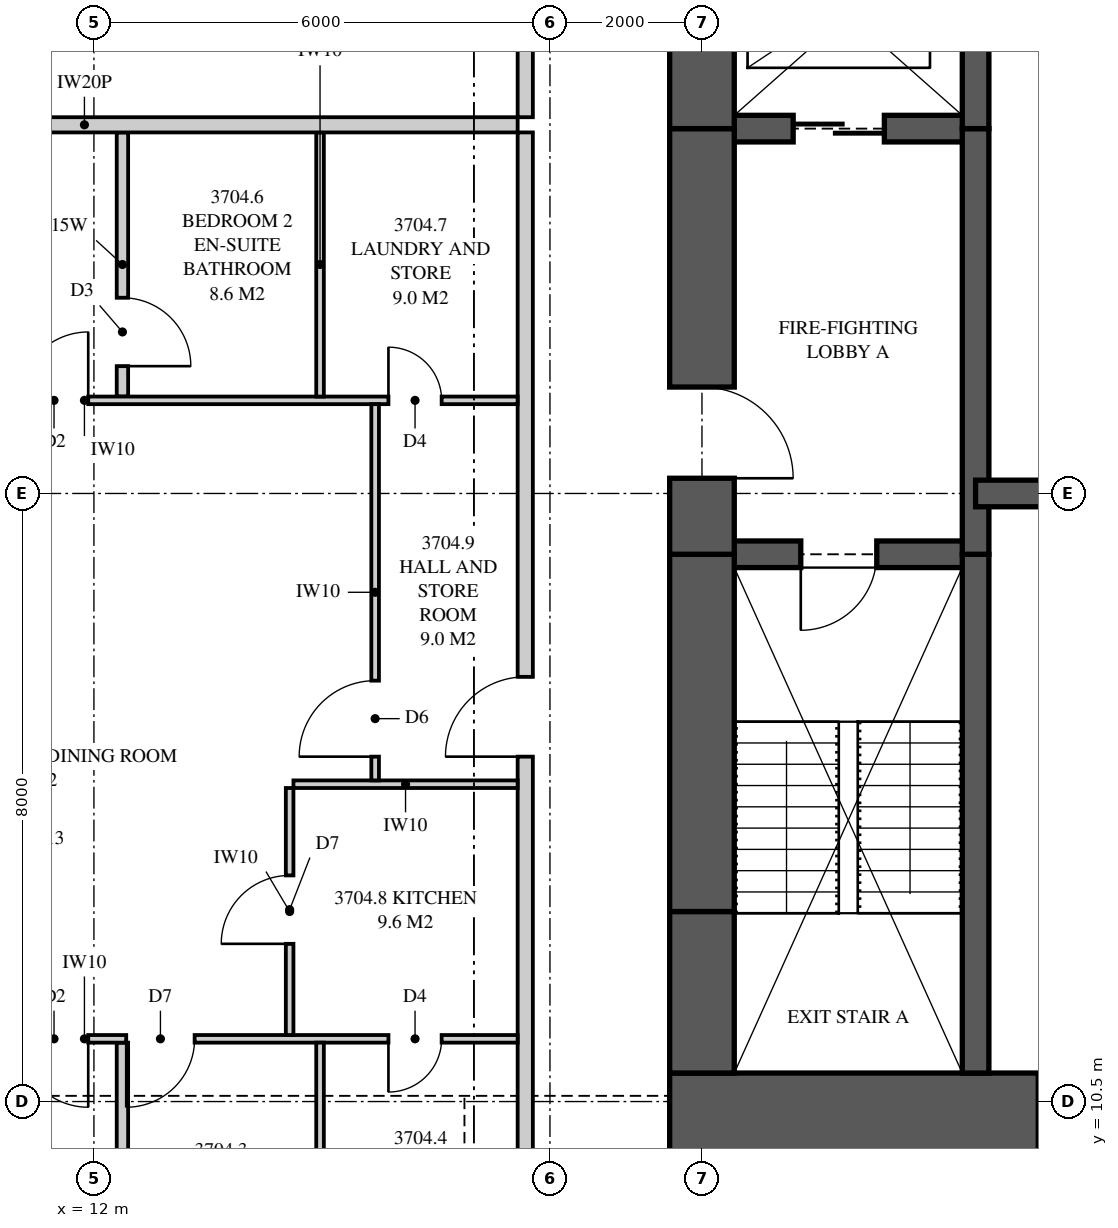
"""IFC4 building model, lengths in metres.
Left out: names, types, materials, properties, quantities, classifications, styles, units other than length and angle.
Written with IfcOpenShell. Run it as: python <this file> out.ifc"""

import sys

from ifc_helpers import new_model, si_unit, direction, frame, frame_2d, origin, place, context, subcontext, project, spatial, polyline, rectangle, outline, extrude, element, fill, save


model = new_model("IFC4")
c1 = context("Model", 3, precision=1e-05, world=origin(), true_north=direction((0.0, 1.0)))
c2 = subcontext(c1, "Body", "Model", "MODEL_VIEW")
j1 = project(units=[si_unit("LENGTHUNIT", "METRE"), si_unit("PLANEANGLEUNIT", "RADIAN")], contexts=[c1])
p1 = place(None, origin())
s1 = spatial("IfcSite", under=j1, at=p1, CompositionType="ELEMENT")
p2 = place(p1, origin())
s2 = spatial("IfcBuilding", under=s1, at=p2, CompositionType="ELEMENT")
p3 = place(p2, frame((0.0, 0.0, 135.0)))
s3 = spatial("IfcBuildingStorey", under=s2, at=p3, CompositionType="ELEMENT", Elevation=135.0)
p4 = place(p3, frame((19.575, 10.125, 0.0), z_axis=(0.0, 0.0, 1.0), x_axis=(1.0, 0.0, 0.0)))
e1 = element("IfcWall", 1, at=p4, inside=s3, PredefinedType="SHEAR", context=c2, shape_type="SweptSolid", body=[
    extrude(rectangle(XDim=6.425, YDim=1.5, at=frame_2d((3.212, 0.0))), origin(), (0.0, 0.0, 1.0), 3.35),
])
p5 = place(p4, frame((4.85, 0.0, 0.0)))
e2 = element("IfcOpeningElement", 2, at=p5, cuts=e1, PredefinedType="OPENING", context=c2, shape_type="SweptSolid", body=[
    extrude(rectangle(XDim=0.75, YDim=2.1, at=frame_2d((0.375, 1.05))), frame((0.0, 0.76, 0.0), z_axis=(0.0, -1.0, 0.0), x_axis=(1.0, 0.0, 0.0)), (0.0, 0.0, 1.0), 1.52),
])
p6 = place(p3, frame((20.0, 26.125, 0.0), z_axis=(0.0, 0.0, 1.0), x_axis=(0.0, -1.0, 0.0)))
e3 = element("IfcWall", 3, at=p6, inside=s3, PredefinedType="SHEAR", context=c2, shape_type="SweptSolid", body=[
    extrude(rectangle(XDim=2.825, YDim=0.85, at=frame_2d((1.413, 0.0))), origin(), (0.0, 0.0, 1.0), 3.35),
])
p7 = place(p3, frame((20.0, 23.3, 0.0), z_axis=(0.0, 0.0, 1.0), x_axis=(0.0, -1.0, 0.0)))
e4 = element("IfcWall", 4, at=p7, inside=s3, PredefinedType="SHEAR", context=c2, shape_type="SweptSolid", body=[
    extrude(rectangle(XDim=5.6, YDim=0.85, at=frame_2d((2.8, 0.0))), origin(), (0.0, 0.0, 1.0), 3.35),
])
p8 = place(p7, frame((3.4, 0.0, 0.0)))
e5 = element("IfcOpeningElement", 5, at=p8, cuts=e4, PredefinedType="OPENING", context=c2, shape_type="SweptSolid", body=[
    extrude(rectangle(XDim=1.2, YDim=2.2, at=frame_2d((0.6, 1.1))), frame((0.0, 0.435, 0.0), z_axis=(0.0, -1.0, 0.0), x_axis=(1.0, 0.0, 0.0)), (0.0, 0.0, 1.0), 0.87),
])
p9 = place(p3, frame((20.0, 17.7, 0.0), z_axis=(0.0, 0.0, 1.0), x_axis=(0.0, -1.0, 0.0)))
e6 = element("IfcWall", 6, at=p9, inside=s3, PredefinedType="SHEAR", context=c2, shape_type="SweptSolid", body=[
    extrude(rectangle(XDim=4.7, YDim=0.85, at=frame_2d((2.35, 0.0))), origin(), (0.0, 0.0, 1.0), 3.35),
])
p10 = place(p3, frame((20.0, 13.0, 0.0), z_axis=(0.0, 0.0, 1.0), x_axis=(0.0, -1.0, 0.0)))
e7 = element("IfcWall", 7, at=p10, inside=s3, PredefinedType="SHEAR", context=c2, shape_type="SweptSolid", body=[
    extrude(rectangle(XDim=2.125, YDim=0.85, at=frame_2d((1.062, 0.0))), origin(), (0.0, 0.0, 1.0), 3.35),
])
p11 = place(p3, frame((23.6, 10.875, 0.0), z_axis=(0.0, 0.0, 1.0), x_axis=(0.0, 1.0, 0.0)))
e8 = element("IfcWall", 8, at=p11, inside=s3, PredefinedType="SHEAR", context=c2, shape_type="SweptSolid", body=[
    extrude(rectangle(XDim=6.825, YDim=0.35, at=frame_2d((3.413, 0.0))), origin(), (0.0, 0.0, 1.0), 3.35),
])
p12 = place(p3, frame((23.6, 17.7, 0.0), z_axis=(0.0, 0.0, 1.0), x_axis=(0.0, 1.0, 0.0)))
e9 = element("IfcWall", 9, at=p12, inside=s3, PredefinedType="SHEAR", context=c2, shape_type="SweptSolid", body=[
    extrude(rectangle(XDim=5.6, YDim=0.35, at=frame_2d((2.8, 0.0))), origin(), (0.0, 0.0, 1.0), 3.35),
])
p13 = place(p3, frame((23.6, 23.3, 0.0), z_axis=(0.0, 0.0, 1.0), x_axis=(0.0, 1.0, 0.0)))
e10 = element("IfcWall", 10, at=p13, inside=s3, PredefinedType="SHEAR", context=c2, shape_type="SweptSolid", body=[
    extrude(rectangle(XDim=2.825, YDim=0.35, at=frame_2d((1.413, 0.0))), origin(), (0.0, 0.0, 1.0), 3.35),
])
p14 = place(p3, frame((20.0, 17.7, 0.0), z_axis=(0.0, 0.0, 1.0), x_axis=(1.0, 0.0, 0.0)))
e11 = element("IfcWall", 11, at=p14, inside=s3, PredefinedType="SHEAR", context=c2, shape_type="SweptSolid", body=[
    extrude(rectangle(XDim=3.6, YDim=0.35, at=frame_2d((1.8, 0.0))), origin(), (0.0, 0.0, 1.0), 3.35),
])
p15 = place(p14, frame((1.3, 0.0, 0.0)))
e12 = element("IfcOpeningElement", 12, at=p15, cuts=e11, PredefinedType="OPENING", context=c2, shape_type="SweptSolid", body=[
    extrude(rectangle(XDim=1.0, YDim=2.1, at=frame_2d((0.5, 1.05))), frame((0.0, 0.185, 0.0), z_axis=(0.0, -1.0, 0.0), x_axis=(1.0, 0.0, 0.0)), (0.0, 0.0, 1.0), 0.37),
])
p16 = place(p3, frame((20.0, 23.3, 0.0), z_axis=(0.0, 0.0, 1.0), x_axis=(1.0, 0.0, 0.0)))
e13 = element("IfcWall", 13, at=p16, inside=s3, PredefinedType="SHEAR", context=c2, shape_type="SweptSolid", body=[
    extrude(rectangle(XDim=3.6, YDim=0.35, at=frame_2d((1.8, 0.0))), origin(), (0.0, 0.0, 1.0), 3.35),
])
p17 = place(p16, frame((1.2, 0.0, 0.0)))
e14 = element("IfcOpeningElement", 14, at=p17, cuts=e13, PredefinedType="OPENING", context=c2, shape_type="SweptSolid", body=[
    extrude(rectangle(XDim=1.2, YDim=2.1, at=frame_2d((0.6, 1.05))), frame((0.0, 0.185, 0.0), z_axis=(0.0, -1.0, 0.0), x_axis=(1.0, 0.0, 0.0)), (0.0, 0.0, 1.0), 0.37),
])
p18 = place(p3, frame((23.6, 18.5, 0.0), z_axis=(0.0, 0.0, 1.0), x_axis=(1.0, 0.0, 0.0)))
e15 = element("IfcWall", 15, at=p18, inside=s3, PredefinedType="SHEAR", context=c2, shape_type="SweptSolid", body=[
    extrude(rectangle(XDim=2.4, YDim=0.35, at=frame_2d((1.2, 0.0))), origin(), (0.0, 0.0, 1.0), 3.35),
])
p19 = place(p3, frame((6.175, 23.35, 0.0), z_axis=(0.0, 0.0, 1.0), x_axis=(1.0, 0.0, 0.0)))
e16 = element("IfcWall", 16, at=p19, inside=s3, PredefinedType="PARTITIONING", context=c2, shape_type="SweptSolid", body=[
    extrude(outline(polyline([(0.529, 2.15), (0.0, 2.15), (0.0, 0.0), (0.529, 0.0), (0.529, 0.376), (1.021, 0.376), (1.021, 0.0), (11.4, 0.0), (11.4, 3.11), (5.335, 3.11), (5.335, 2.51), (2.715, 2.51), (2.715, 3.11), (1.685, 3.11), (1.685, 2.15), (1.021, 2.15), (1.021, 1.774), (0.529, 1.774), (0.529, 2.15)])), frame((0.0, 0.1, 0.0), z_axis=(0.0, -1.0, 0.0), x_axis=(1.0, 0.0, 0.0)), (0.0, 0.0, 1.0), 0.2),
])
p20 = place(p3, frame((17.675, 7.825, 0.0), z_axis=(0.0, 0.0, 1.0), x_axis=(0.0, 1.0, 0.0)))
e17 = element("IfcWall", 17, at=p20, inside=s3, PredefinedType="PARTITIONING", context=c2, shape_type="SweptSolid", body=[
    extrude(outline(polyline([(0.0, 0.0), (15.425, 0.0), (15.425, 3.11), (3.087, 3.11), (3.087, 2.541), (2.413, 2.541), (2.413, 3.11), (0.0, 3.11), (0.0, 0.0)])), frame((0.0, 0.1, 0.0), z_axis=(0.0, -1.0, 0.0), x_axis=(1.0, 0.0, 0.0)), (0.0, 0.0, 1.0), 0.2),
])
p21 = place(p20, frame((7.212, 0.0, 0.0)))
e18 = element("IfcOpeningElement", 18, at=p21, cuts=e17, PredefinedType="OPENING", context=c2, shape_type="SweptSolid", body=[
    extrude(rectangle(XDim=1.05, YDim=2.2, at=frame_2d((0.525, 1.1))), frame((0.0, 0.11, 0.0), z_axis=(0.0, -1.0, 0.0), x_axis=(1.0, 0.0, 0.0)), (0.0, 0.0, 1.0), 0.22),
])
p22 = place(p3, frame((6.175, 11.325, 0.0), z_axis=(0.0, 0.0, 1.0), x_axis=(1.0, 0.0, 0.0)))
e19 = element("IfcWall", 19, at=p22, inside=s3, PredefinedType="PARTITIONING", context=c2, shape_type="SweptSolid", body=[
    extrude(outline(polyline([(0.175, 3.11), (0.0, 3.11), (0.0, 0.0), (0.529, 0.0), (0.529, 0.325), (1.021, 0.325), (1.021, 0.0), (11.4, 0.0), (11.4, 3.11), (5.285, 3.11), (5.285, 2.51), (2.765, 2.51), (2.765, 3.11), (2.744, 3.11), (2.744, 2.541), (2.169, 2.541), (2.169, 3.11), (1.918, 3.11), (1.918, 2.15), (1.021, 2.15), (1.021, 1.825), (0.529, 1.825), (0.529, 2.15), (0.175, 2.15), (0.175, 3.11)])), frame((0.0, 0.05, 0.0), z_axis=(0.0, -1.0, 0.0), x_axis=(1.0, 0.0, 0.0)), (0.0, 0.0, 1.0), 0.1),
])
p23 = place(p22, frame((4.85, 0.0, 0.0)))
e20 = element("IfcOpeningElement", 20, at=p23, cuts=e19, PredefinedType="OPENING", context=c2, shape_type="SweptSolid", body=[
    extrude(rectangle(XDim=0.9, YDim=2.1, at=frame_2d((0.45, 1.05))), frame((0.0, 0.06, 0.0), z_axis=(0.0, -1.0, 0.0), x_axis=(1.0, 0.0, 0.0)), (0.0, 0.0, 1.0), 0.12),
])
p24 = place(p22, frame((6.25, 0.0, 0.0)))
e21 = element("IfcOpeningElement", 21, at=p24, cuts=e19, PredefinedType="OPENING", context=c2, shape_type="SweptSolid", body=[
    extrude(rectangle(XDim=0.9, YDim=2.1, at=frame_2d((0.45, 1.05))), frame((0.0, 0.06, 0.0), z_axis=(0.0, -1.0, 0.0), x_axis=(1.0, 0.0, 0.0)), (0.0, 0.0, 1.0), 0.12),
])
p25 = place(p22, frame((9.7, 0.0, 0.0)))
e22 = element("IfcOpeningElement", 22, at=p25, cuts=e19, PredefinedType="OPENING", context=c2, shape_type="SweptSolid", body=[
    extrude(rectangle(XDim=0.7, YDim=2.1, at=frame_2d((0.35, 1.05))), frame((0.0, 0.06, 0.0), z_axis=(0.0, -1.0, 0.0), x_axis=(1.0, 0.0, 0.0)), (0.0, 0.0, 1.0), 0.12),
])
p26 = place(p3, frame((6.175, 19.725, 0.0), z_axis=(0.0, 0.0, 1.0), x_axis=(1.0, 0.0, 0.0)))
e23 = element("IfcWall", 23, at=p26, inside=s3, PredefinedType="PARTITIONING", context=c2, shape_type="SweptSolid", body=[
    extrude(outline(polyline([(0.0, 0.0), (11.4, 0.0), (11.4, 3.11), (5.285, 3.11), (5.285, 2.51), (2.765, 2.51), (2.765, 3.11), (1.635, 3.11), (1.635, 2.15), (0.0, 2.15), (0.0, 3.11), (0.0, 0.0)])), frame((0.0, 0.05, 0.0), z_axis=(0.0, -1.0, 0.0), x_axis=(1.0, 0.0, 0.0)), (0.0, 0.0, 1.0), 0.1),
])
p27 = place(p26, frame((4.85, 0.0, 0.0)))
e24 = element("IfcOpeningElement", 24, at=p27, cuts=e23, PredefinedType="OPENING", context=c2, shape_type="SweptSolid", body=[
    extrude(rectangle(XDim=0.9, YDim=2.1, at=frame_2d((0.45, 1.05))), frame((0.0, 0.06, 0.0), z_axis=(0.0, -1.0, 0.0), x_axis=(1.0, 0.0, 0.0)), (0.0, 0.0, 1.0), 0.12),
])
p28 = place(p26, frame((9.7, 0.0, 0.0)))
e25 = element("IfcOpeningElement", 25, at=p28, cuts=e23, PredefinedType="OPENING", context=c2, shape_type="SweptSolid", body=[
    extrude(rectangle(XDim=0.7, YDim=2.1, at=frame_2d((0.35, 1.05))), frame((0.0, 0.06, 0.0), z_axis=(0.0, -1.0, 0.0), x_axis=(1.0, 0.0, 0.0)), (0.0, 0.0, 1.0), 0.12),
])
p29 = place(p3, frame((12.375, 7.825, 0.0), z_axis=(0.0, 0.0, 1.0), x_axis=(0.0, 1.0, 0.0)))
e26 = element("IfcWall", 26, at=p29, inside=s3, PredefinedType="PLUMBINGWALL", context=c2, shape_type="SweptSolid", body=[
    extrude(outline(polyline([(0.0, 0.0), (3.45, 0.0), (3.45, 3.11), (3.062, 3.11), (3.062, 2.541), (2.438, 2.541), (2.438, 3.11), (0.0, 3.11), (0.0, 0.0)])), frame((0.0, 0.075, 0.0), z_axis=(0.0, -1.0, 0.0), x_axis=(1.0, 0.0, 0.0)), (0.0, 0.0, 1.0), 0.15),
])
p30 = place(p3, frame((14.975, 7.825, 0.0), z_axis=(0.0, 0.0, 1.0), x_axis=(0.0, 1.0, 0.0)))
e27 = element("IfcWall", 27, at=p30, inside=s3, PredefinedType="PARTITIONING", context=c2, shape_type="SweptSolid", body=[
    extrude(outline(polyline([(0.0, 0.0), (3.45, 0.0), (3.45, 3.11), (3.037, 3.11), (3.037, 2.541), (2.463, 2.541), (2.463, 3.11), (0.0, 3.11), (0.0, 0.0)])), frame((0.0, 0.05, 0.0), z_axis=(0.0, -1.0, 0.0), x_axis=(1.0, 0.0, 0.0)), (0.0, 0.0, 1.0), 0.1),
])
p31 = place(p3, frame((12.375, 19.775, 0.0), z_axis=(0.0, 0.0, 1.0), x_axis=(0.0, 1.0, 0.0)))
e28 = element("IfcWall", 28, at=p31, inside=s3, PredefinedType="PLUMBINGWALL", context=c2, shape_type="SweptSolid", body=[
    extrude(rectangle(XDim=3.475, YDim=0.15, at=frame_2d((1.738, 0.0))), origin(), (0.0, 0.0, 1.0), 3.11),
])
p32 = place(p31, frame((0.4, 0.0, 0.0)))
e29 = element("IfcOpeningElement", 29, at=p32, cuts=e28, PredefinedType="OPENING", context=c2, shape_type="SweptSolid", body=[
    extrude(rectangle(XDim=0.9, YDim=2.1, at=frame_2d((0.45, 1.05))), frame((0.0, 0.085, 0.0), z_axis=(0.0, -1.0, 0.0), x_axis=(1.0, 0.0, 0.0)), (0.0, 0.0, 1.0), 0.17),
])
p33 = place(p3, frame((14.975, 19.775, 0.0), z_axis=(0.0, 0.0, 1.0), x_axis=(0.0, 1.0, 0.0)))
e30 = element("IfcWall", 30, at=p33, inside=s3, PredefinedType="PARTITIONING", context=c2, shape_type="SweptSolid", body=[
    extrude(rectangle(XDim=3.475, YDim=0.1, at=frame_2d((1.738, 0.0))), origin(), (0.0, 0.0, 1.0), 3.11),
])
p34 = place(p3, frame((14.575, 11.375, 0.0), z_axis=(0.0, 0.0, 1.0), x_axis=(0.0, 1.0, 0.0)))
e31 = element("IfcWall", 31, at=p34, inside=s3, PredefinedType="PARTITIONING", context=c2, shape_type="SweptSolid", body=[
    extrude(rectangle(XDim=3.25, YDim=0.1, at=frame_2d((1.625, 0.0))), origin(), (0.0, 0.0, 1.0), 3.11),
])
p35 = place(p34, frame((1.2, 0.0, 0.0)))
e32 = element("IfcOpeningElement", 32, at=p35, cuts=e31, PredefinedType="OPENING", context=c2, shape_type="SweptSolid", body=[
    extrude(rectangle(XDim=0.9, YDim=2.1, at=frame_2d((0.45, 1.05))), frame((0.0, 0.06, 0.0), z_axis=(0.0, -1.0, 0.0), x_axis=(1.0, 0.0, 0.0)), (0.0, 0.0, 1.0), 0.12),
])
p36 = place(p3, frame((14.625, 14.675, 0.0), z_axis=(0.0, 0.0, 1.0), x_axis=(1.0, 0.0, 0.0)))
e33 = element("IfcWall", 33, at=p36, inside=s3, PredefinedType="PARTITIONING", context=c2, shape_type="SweptSolid", body=[
    extrude(rectangle(XDim=2.95, YDim=0.1, at=frame_2d((1.475, 0.0))), origin(), (0.0, 0.0, 1.0), 3.11),
])
p37 = place(p3, frame((15.7, 14.725, 0.0), z_axis=(0.0, 0.0, 1.0), x_axis=(0.0, 1.0, 0.0)))
e34 = element("IfcWall", 34, at=p37, inside=s3, PredefinedType="PARTITIONING", context=c2, shape_type="SweptSolid", body=[
    extrude(rectangle(XDim=4.95, YDim=0.1, at=frame_2d((2.475, 0.0))), origin(), (0.0, 0.0, 1.0), 3.11),
])
p38 = place(p37, frame((0.312, 0.0, 0.0)))
e35 = element("IfcOpeningElement", 35, at=p38, cuts=e34, PredefinedType="OPENING", context=c2, shape_type="SweptSolid", body=[
    extrude(rectangle(XDim=1.0, YDim=2.1, at=frame_2d((0.5, 1.05))), frame((0.0, 0.06, 0.0), z_axis=(0.0, -1.0, 0.0), x_axis=(1.0, 0.0, 0.0)), (0.0, 0.0, 1.0), 0.12),
])
p39 = place(p3, frame((17.675, 23.45, 0.0), z_axis=(0.0, 0.0, 1.0), x_axis=(0.0, 1.0, 0.0)))
e36 = element("IfcWall", 36, at=p39, inside=s3, PredefinedType="PARTITIONING", context=c2, shape_type="SweptSolid", body=[
    extrude(outline(polyline([(0.0, 0.0), (5.725, 0.0), (5.725, 3.11), (3.312, 3.11), (3.312, 2.541), (2.638, 2.541), (2.638, 3.11), (0.0, 3.11), (0.0, 0.0)])), frame((0.0, 0.1, 0.0), z_axis=(0.0, -1.0, 0.0), x_axis=(1.0, 0.0, 0.0)), (0.0, 0.0, 1.0), 0.2),
])
p40 = place(p39, frame((1.962, 0.0, 0.0)))
e37 = element("IfcOpeningElement", 37, at=p40, cuts=e36, PredefinedType="OPENING", context=c2, shape_type="SweptSolid", body=[
    extrude(rectangle(XDim=1.8, YDim=2.1, at=frame_2d((0.9, 1.05))), frame((0.0, 0.11, 0.0), z_axis=(0.0, -1.0, 0.0), x_axis=(1.0, 0.0, 0.0)), (0.0, 0.0, 1.0), 0.22),
])
p41 = place(p21, origin())
e38 = element("IfcDoor", 38, at=p41, inside=s3, OperationType="SINGLE_SWING_LEFT", PredefinedType="DOOR", context=c2, shape_type="SweptSolid", body=[
    extrude(rectangle(XDim=1.05, YDim=2.2, at=frame_2d((0.525, 1.1))), frame((0.0, 0.025, 0.0), z_axis=(0.0, -1.0, 0.0), x_axis=(1.0, 0.0, 0.0)), (0.0, 0.0, 1.0), 0.05),
])
fill(e18, e38)
p42 = place(p23, frame((0.9, 0.0, 0.0), z_axis=(0.0, 0.0, 1.0), x_axis=(-1.0, 0.0, 0.0)))
e39 = element("IfcDoor", 39, at=p42, inside=s3, OperationType="SINGLE_SWING_LEFT", PredefinedType="DOOR", context=c2, shape_type="SweptSolid", body=[
    extrude(rectangle(XDim=0.9, YDim=2.1, at=frame_2d((0.45, 1.05))), frame((0.0, 0.025, 0.0), z_axis=(0.0, -1.0, 0.0), x_axis=(1.0, 0.0, 0.0)), (0.0, 0.0, 1.0), 0.05),
])
fill(e20, e39)
p43 = place(p24, frame((0.9, 0.0, 0.0), z_axis=(0.0, 0.0, 1.0), x_axis=(-1.0, 0.0, 0.0)))
e40 = element("IfcDoor", 40, at=p43, inside=s3, OperationType="SINGLE_SWING_RIGHT", PredefinedType="DOOR", context=c2, shape_type="SweptSolid", body=[
    extrude(rectangle(XDim=0.9, YDim=2.1, at=frame_2d((0.45, 1.05))), frame((0.0, 0.025, 0.0), z_axis=(0.0, -1.0, 0.0), x_axis=(1.0, 0.0, 0.0)), (0.0, 0.0, 1.0), 0.05),
])
fill(e21, e40)
p44 = place(p25, frame((0.7, 0.0, 0.0), z_axis=(0.0, 0.0, 1.0), x_axis=(-1.0, 0.0, 0.0)))
e41 = element("IfcDoor", 41, at=p44, inside=s3, OperationType="SINGLE_SWING_RIGHT", PredefinedType="DOOR", context=c2, shape_type="SweptSolid", body=[
    extrude(rectangle(XDim=0.7, YDim=2.1, at=frame_2d((0.35, 1.05))), frame((0.0, 0.025, 0.0), z_axis=(0.0, -1.0, 0.0), x_axis=(1.0, 0.0, 0.0)), (0.0, 0.0, 1.0), 0.05),
])
fill(e22, e41)
p45 = place(p27, origin())
e42 = element("IfcDoor", 42, at=p45, inside=s3, OperationType="SINGLE_SWING_RIGHT", PredefinedType="DOOR", context=c2, shape_type="SweptSolid", body=[
    extrude(rectangle(XDim=0.9, YDim=2.1, at=frame_2d((0.45, 1.05))), frame((0.0, 0.025, 0.0), z_axis=(0.0, -1.0, 0.0), x_axis=(1.0, 0.0, 0.0)), (0.0, 0.0, 1.0), 0.05),
])
fill(e24, e42)
p46 = place(p32, frame((0.9, 0.0, 0.0), z_axis=(0.0, 0.0, 1.0), x_axis=(-1.0, 0.0, 0.0)))
e43 = element("IfcDoor", 43, at=p46, inside=s3, OperationType="SINGLE_SWING_RIGHT", PredefinedType="DOOR", context=c2, shape_type="SweptSolid", body=[
    extrude(rectangle(XDim=0.9, YDim=2.1, at=frame_2d((0.45, 1.05))), frame((0.0, 0.025, 0.0), z_axis=(0.0, -1.0, 0.0), x_axis=(1.0, 0.0, 0.0)), (0.0, 0.0, 1.0), 0.05),
])
fill(e29, e43)
p47 = place(p28, origin())
e44 = element("IfcDoor", 44, at=p47, inside=s3, OperationType="SINGLE_SWING_LEFT", PredefinedType="DOOR", context=c2, shape_type="SweptSolid", body=[
    extrude(rectangle(XDim=0.7, YDim=2.1, at=frame_2d((0.35, 1.05))), frame((0.0, 0.025, 0.0), z_axis=(0.0, -1.0, 0.0), x_axis=(1.0, 0.0, 0.0)), (0.0, 0.0, 1.0), 0.05),
])
fill(e25, e44)
p48 = place(p35, origin())
e45 = element("IfcDoor", 45, at=p48, inside=s3, OperationType="SINGLE_SWING_LEFT", PredefinedType="DOOR", context=c2, shape_type="SweptSolid", body=[
    extrude(rectangle(XDim=0.9, YDim=2.1, at=frame_2d((0.45, 1.05))), frame((0.0, 0.025, 0.0), z_axis=(0.0, -1.0, 0.0), x_axis=(1.0, 0.0, 0.0)), (0.0, 0.0, 1.0), 0.05),
])
fill(e32, e45)
p49 = place(p38, origin())
e46 = element("IfcDoor", 46, at=p49, inside=s3, OperationType="SINGLE_SWING_LEFT", PredefinedType="DOOR", context=c2, shape_type="SweptSolid", body=[
    extrude(rectangle(XDim=1.0, YDim=2.1, at=frame_2d((0.5, 1.05))), frame((0.0, 0.025, 0.0), z_axis=(0.0, -1.0, 0.0), x_axis=(1.0, 0.0, 0.0)), (0.0, 0.0, 1.0), 0.05),
])
fill(e35, e46)
p50 = place(p15, frame((1.0, 0.0, 0.0), z_axis=(0.0, 0.0, 1.0), x_axis=(-1.0, 0.0, 0.0)))
e47 = element("IfcDoor", 47, at=p50, inside=s3, OperationType="SINGLE_SWING_RIGHT", PredefinedType="DOOR", context=c2, shape_type="SweptSolid", body=[
    extrude(rectangle(XDim=1.0, YDim=2.1, at=frame_2d((0.5, 1.05))), frame((0.0, 0.025, 0.0), z_axis=(0.0, -1.0, 0.0), x_axis=(1.0, 0.0, 0.0)), (0.0, 0.0, 1.0), 0.05),
])
fill(e12, e47)
p51 = place(p8, origin())
e48 = element("IfcDoor", 48, at=p51, inside=s3, OperationType="SINGLE_SWING_RIGHT", PredefinedType="DOOR", context=c2, shape_type="SweptSolid", body=[
    extrude(rectangle(XDim=1.2, YDim=2.2, at=frame_2d((0.6, 1.1))), frame((0.0, 0.025, 0.0), z_axis=(0.0, -1.0, 0.0), x_axis=(1.0, 0.0, 0.0)), (0.0, 0.0, 1.0), 0.05),
])
fill(e5, e48)
p52 = place(p17, origin())
e49 = element("IfcDoor", 49, at=p52, inside=s3, OperationType="SLIDING_TO_LEFT", PredefinedType="DOOR", context=c2, shape_type="SweptSolid", body=[
    extrude(rectangle(XDim=1.2, YDim=2.1, at=frame_2d((0.6, 1.05))), frame((0.0, 0.025, 0.0), z_axis=(0.0, -1.0, 0.0), x_axis=(1.0, 0.0, 0.0)), (0.0, 0.0, 1.0), 0.05),
])
fill(e14, e49)
save(model, sys.argv[1])
